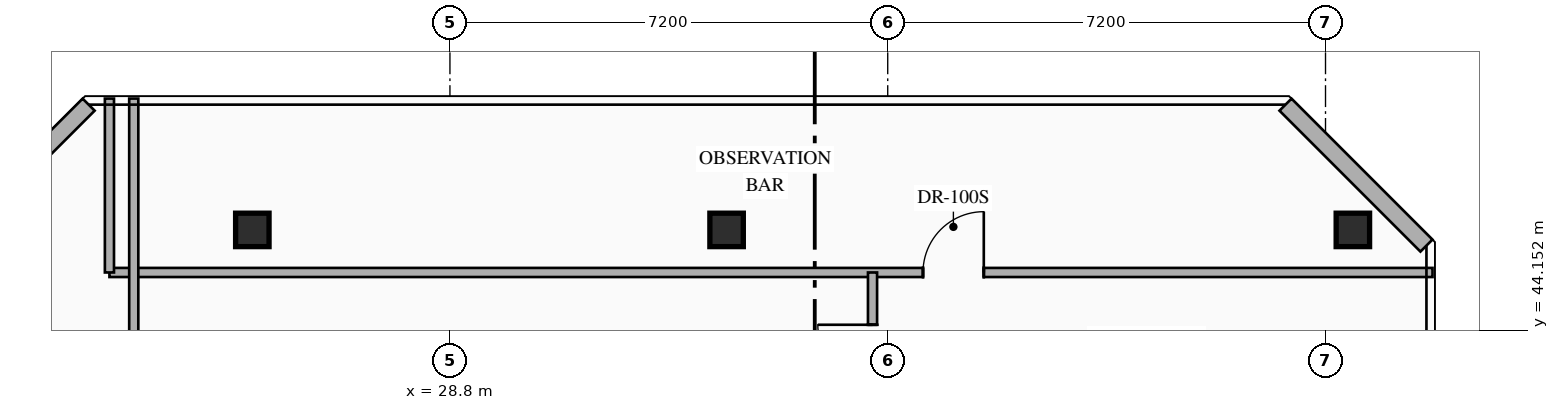
"""IFC4 building model, lengths in metres.
Left out: names, types, materials, properties, quantities, classifications, styles, units other than length and angle.
Written with IfcOpenShell. Run it as: python <this file> out.ifc"""

import sys

from ifc_helpers import new_model, si_unit, direction, frame, frame_2d, origin, origin_2d, place, context, subcontext, project, spatial, rectangle, hollow_rectangle, extrude, element, fill, save


model = new_model("IFC4")
c1 = context("Model", 3, precision=1e-05, world=origin(), true_north=direction((0.0, 1.0)))
c2 = subcontext(c1, "Body", "Model", "MODEL_VIEW")
j1 = project(units=[si_unit("LENGTHUNIT", "METRE"), si_unit("PLANEANGLEUNIT", "RADIAN")], contexts=[c1])
p1 = place(None, origin())
s1 = spatial("IfcSite", under=j1, at=p1, CompositionType="ELEMENT")
p2 = place(p1, origin())
s2 = spatial("IfcBuilding", under=s1, at=p2, CompositionType="ELEMENT")
p3 = place(p2, frame((0.0, 0.0, 285.95)))
s3 = spatial("IfcBuildingStorey", under=s2, at=p3, CompositionType="ELEMENT", Elevation=285.95)
for number, where, z_axis, x_axis in (
    (1, (25.55, 45.8, 0.0), (0.0, 0.0, 1.0), (1.0, 0.0, 0.0)),
    (2, (33.35, 45.8, 0.0), (0.0, 0.0, 1.0), (1.0, 0.0, 0.0)),
    (3, (43.65, 45.8, 0.0), (0.0, 0.0, 1.0), (1.0, 0.0, 0.0)),
):
    element("IfcColumn", number, at=place(p3, frame(where, z_axis=z_axis, x_axis=x_axis)), inside=s3, PredefinedType="COLUMN", context=c2, shape_type="SweptSolid", body=[
        extrude(hollow_rectangle(XDim=0.55, YDim=0.55, WallThickness=0.022, at=origin_2d()), origin(), (0.0, 0.0, 1.0), 4.0),
    ])
p4 = place(p3, frame((20.54, 45.542, 0.0), z_axis=(0.0, 0.0, 1.0), x_axis=(0.707069542501, 0.707144017911, 0.0)))
e4 = element("IfcWall", 4, at=p4, inside=s3, PredefinedType="STANDARD", context=c2, shape_type="SweptSolid", body=[
    extrude(rectangle(XDim=3.278, YDim=0.28, at=frame_2d((1.639, 0.0))), origin(), (0.0, 0.0, 1.0), 3.7),
])
p5 = place(p3, frame((42.542, 47.86, 0.0), z_axis=(0.0, 0.0, 1.0), x_axis=(0.707106781187, -0.707106781187, 0.0)))
e5 = element("IfcWall", 5, at=p5, inside=s3, PredefinedType="STANDARD", context=c2, shape_type="SweptSolid", body=[
    extrude(rectangle(XDim=3.278, YDim=0.28, at=frame_2d((1.639, 0.0))), origin(), (0.0, 0.0, 1.0), 3.7),
])
p6 = place(p3, frame((23.2, 45.1, 0.0), z_axis=(0.0, 0.0, 1.0), x_axis=(1.0, 0.0, 0.0)))
e6 = element("IfcWall", 6, at=p6, inside=s3, PredefinedType="PARTITIONING", context=c2, shape_type="SweptSolid", body=[
    extrude(rectangle(XDim=21.76, YDim=0.15, at=frame_2d((10.88, 0.0))), origin(), (0.0, 0.0, 1.0), 3.7),
])
p7 = place(p6, frame((13.38, 0.0, 0.0)))
e7 = element("IfcOpeningElement", 7, at=p7, cuts=e6, PredefinedType="OPENING", context=c2, shape_type="SweptSolid", body=[
    extrude(rectangle(XDim=1.0, YDim=2.15, at=frame_2d((0.5, 1.075))), frame((0.0, 0.085, 0.0), z_axis=(0.0, -1.0, 0.0), x_axis=(1.0, 0.0, 0.0)), (0.0, 0.0, 1.0), 0.17),
])
p8 = place(p3, frame((23.2, 45.1, 0.0), z_axis=(0.0, 0.0, 1.0), x_axis=(0.0, 1.0, 0.0)))
e8 = element("IfcWall", 8, at=p8, inside=s3, PredefinedType="PARTITIONING", context=c2, shape_type="SweptSolid", body=[
    extrude(rectangle(XDim=2.86, YDim=0.15, at=frame_2d((1.43, 0.0))), origin(), (0.0, 0.0, 1.0), 3.7),
])
p9 = place(p3, frame((35.75, 42.48, 0.0), z_axis=(0.0, 0.0, 1.0), x_axis=(0.0, 1.0, 0.0)))
e9 = element("IfcWall", 9, at=p9, inside=s3, PredefinedType="PARTITIONING", context=c2, shape_type="SweptSolid", body=[
    extrude(rectangle(XDim=2.62, YDim=0.15, at=frame_2d((1.31, 0.0))), origin(), (0.0, 0.0, 1.0), 3.7),
])
p10 = place(p9, frame((0.86, 0.0, 0.0)))
e10 = element("IfcOpeningElement", 10, at=p10, cuts=e9, PredefinedType="OPENING", context=c2, shape_type="SweptSolid", body=[
    extrude(rectangle(XDim=0.9, YDim=2.15, at=frame_2d((0.45, 1.075))), frame((0.0, 0.085, 0.0), z_axis=(0.0, -1.0, 0.0), x_axis=(1.0, 0.0, 0.0)), (0.0, 0.0, 1.0), 0.17),
])
p11 = place(p3, frame((23.6, 40.15, 0.0), z_axis=(0.0, 0.0, 1.0), x_axis=(0.0, 1.0, 0.0)))
e11 = element("IfcWall", 11, at=p11, inside=s3, PredefinedType="PARTITIONING", context=c2, shape_type="SweptSolid", body=[
    extrude(rectangle(XDim=7.81, YDim=0.15, at=frame_2d((3.905, 0.0))), origin(), (0.0, 0.0, 1.0), 3.7),
])
p12 = place(p11, frame((0.688, 0.0, 0.0)))
e12 = element("IfcOpeningElement", 12, at=p12, cuts=e11, PredefinedType="OPENING", context=c2, shape_type="SweptSolid", body=[
    extrude(rectangle(XDim=0.9, YDim=2.15, at=frame_2d((0.45, 1.075))), frame((0.0, 0.085, 0.0), z_axis=(0.0, -1.0, 0.0), x_axis=(1.0, 0.0, 0.0)), (0.0, 0.0, 1.0), 0.17),
])
p13 = place(p7, origin())
e13 = element("IfcDoor", 13, at=p13, inside=s3, OperationType="SINGLE_SWING_RIGHT", PredefinedType="DOOR", context=c2, shape_type="SweptSolid", body=[
    extrude(rectangle(XDim=1.0, YDim=2.15, at=frame_2d((0.5, 1.075))), frame((0.0, 0.025, 0.0), z_axis=(0.0, -1.0, 0.0), x_axis=(1.0, 0.0, 0.0)), (0.0, 0.0, 1.0), 0.05),
])
fill(e7, e13)
p14 = place(p10, origin())
e14 = element("IfcDoor", 14, at=p14, inside=s3, OperationType="SINGLE_SWING_RIGHT", PredefinedType="DOOR", context=c2, shape_type="SweptSolid", body=[
    extrude(rectangle(XDim=0.9, YDim=2.15, at=frame_2d((0.45, 1.075))), frame((0.0, 0.025, 0.0), z_axis=(0.0, -1.0, 0.0), x_axis=(1.0, 0.0, 0.0)), (0.0, 0.0, 1.0), 0.05),
])
fill(e10, e14)
save(model, sys.argv[1])
